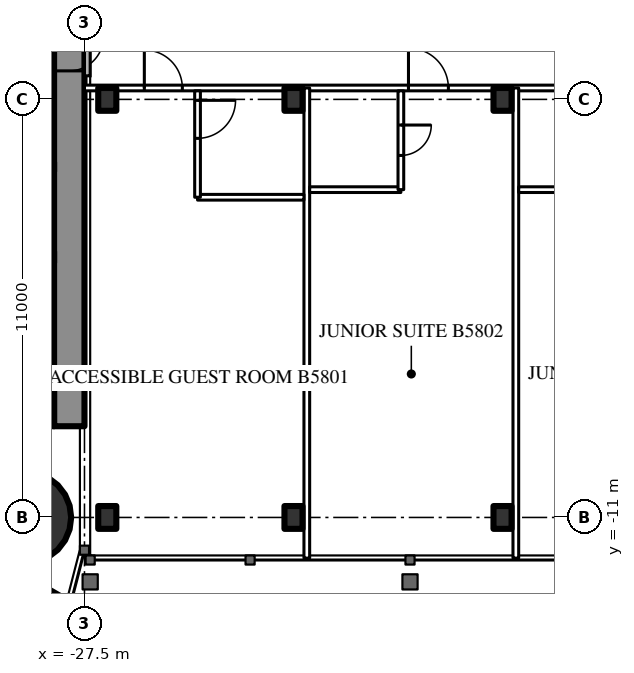
"""IFC4 building model, lengths in metres.
Left out: names, types, materials, properties, quantities, classifications, styles, units other than length and angle.
Written with IfcOpenShell. Run it as: python <this file> out.ifc"""

import sys

from ifc_helpers import new_model, si_unit, direction, frame, frame_2d, origin, origin_2d, place, context, subcontext, project, spatial, rectangle, circle, i_section, extrude, element, fill, save


model = new_model("IFC4")
c1 = context("Model", 3, precision=1e-05, world=origin(), true_north=direction((0.0, 1.0)))
c2 = subcontext(c1, "Body", "Model", "MODEL_VIEW")
j1 = project(units=[si_unit("LENGTHUNIT", "METRE"), si_unit("PLANEANGLEUNIT", "RADIAN")], contexts=[c1])
p1 = place(None, origin())
s1 = spatial("IfcSite", under=j1, at=p1, CompositionType="ELEMENT")
p2 = place(p1, origin())
s2 = spatial("IfcBuilding", under=s1, at=p2, CompositionType="ELEMENT")
p3 = place(p2, frame((0.0, 0.0, 218.9)))
s3 = spatial("IfcBuildingStorey", under=s2, at=p3, CompositionType="ELEMENT", Elevation=218.9)
p4 = place(p3, frame((-29.05, -11.0, 0.0), z_axis=(0.0, 0.0, 1.0), x_axis=(1.0, 0.0, 0.0)))
e1 = element("IfcColumn", 1, at=p4, inside=s3, PredefinedType="COLUMN", context=c2, shape_type="SweptSolid", body=[
    extrude(circle(Radius=1.2, at=origin_2d()), origin(), (0.0, 0.0, 1.0), 3.6),
])
p5 = place(p3, frame((-27.9, 8.6, 0.0), z_axis=(0.0, 0.0, 1.0), x_axis=(0.0, -1.0, 0.0)))
e2 = element("IfcWall", 2, at=p5, inside=s3, PredefinedType="SHEAR", context=c2, shape_type="SweptSolid", body=[
    extrude(rectangle(XDim=17.2, YDim=0.8, at=frame_2d((8.6, 0.0))), origin(), (0.0, 0.0, 1.0), 3.6),
])
p6 = place(p5, frame((6.95, 0.0, 0.0)))
e3 = element("IfcOpeningElement", 3, at=p6, cuts=e2, PredefinedType="OPENING", context=c2, shape_type="SweptSolid", body=[
    extrude(rectangle(XDim=0.9, YDim=2.2, at=frame_2d((0.45, 1.1))), frame((0.0, 0.41, 0.0), z_axis=(0.0, -1.0, 0.0), x_axis=(1.0, 0.0, 0.0)), (0.0, 0.0, 1.0), 0.82),
])
p7 = place(p3, frame((-28.3, -8.0, 0.0), z_axis=(0.0, 0.0, 1.0), x_axis=(-1.0, 0.0, 0.0)))
e4 = element("IfcWall", 4, at=p7, inside=s3, PredefinedType="SHEAR", context=c2, shape_type="SweptSolid", body=[
    extrude(rectangle(XDim=8.4, YDim=1.2, at=frame_2d((4.2, 0.0))), origin(), (0.0, 0.0, 1.0), 3.6),
])
p8 = place(p7, frame((0.25, 0.0, 0.0)))
e5 = element("IfcOpeningElement", 5, at=p8, cuts=e4, PredefinedType="OPENING", context=c2, shape_type="SweptSolid", body=[
    extrude(rectangle(XDim=1.0, YDim=2.2, at=frame_2d((0.5, 1.1))), frame((0.0, 0.61, 0.0), z_axis=(0.0, -1.0, 0.0), x_axis=(1.0, 0.0, 0.0)), (0.0, 0.0, 1.0), 1.22),
])
p9 = place(p3, frame((-28.3, -4.15, 0.0), z_axis=(0.0, 0.0, 1.0), x_axis=(-1.0, 0.0, 0.0)))
e6 = element("IfcWall", 6, at=p9, inside=s3, PredefinedType="SHEAR", context=c2, shape_type="SweptSolid", body=[
    extrude(rectangle(XDim=8.4, YDim=0.3, at=frame_2d((4.2, 0.0))), origin(), (0.0, 0.0, 1.0), 3.6),
])
p10 = place(p3, frame((-28.3, -1.775, 0.0), z_axis=(0.0, 0.0, 1.0), x_axis=(-1.0, 0.0, 0.0)))
e7 = element("IfcWall", 7, at=p10, inside=s3, PredefinedType="SHEAR", context=c2, shape_type="SweptSolid", body=[
    extrude(rectangle(XDim=2.9, YDim=0.25, at=frame_2d((1.45, 0.0))), origin(), (0.0, 0.0, 1.0), 3.6),
])
p11 = place(p3, frame((-27.2, 14.3, 0.0), z_axis=(0.0, 0.0, 1.0), x_axis=(-0.866026593062, -0.499997940104, 0.0)))
e8 = element("IfcWall", 8, at=p11, inside=s3, PredefinedType="SHEAR", context=c2, shape_type="SweptSolid", body=[
    extrude(rectangle(XDim=28.946, YDim=1.2, at=frame_2d((14.473, 0.0))), origin(), (0.0, 0.0, 1.0), 3.6),
])
p12 = place(p11, frame((4.6, 0.0, 0.0)))
e9 = element("IfcOpeningElement", 9, at=p12, cuts=e8, PredefinedType="OPENING", context=c2, shape_type="SweptSolid", body=[
    extrude(rectangle(XDim=1.0, YDim=2.2, at=frame_2d((0.5, 1.1))), frame((0.0, 0.61, 0.0), z_axis=(0.0, -1.0, 0.0), x_axis=(1.0, 0.0, 0.0)), (0.0, 0.0, 1.0), 1.22),
])
p13 = place(p11, frame((13.395, 0.0, 0.0)))
e10 = element("IfcOpeningElement", 10, at=p13, cuts=e8, PredefinedType="OPENING", context=c2, shape_type="SweptSolid", body=[
    extrude(rectangle(XDim=1.8, YDim=2.2, at=frame_2d((0.9, 1.1))), frame((0.0, 0.61, 0.0), z_axis=(0.0, -1.0, 0.0), x_axis=(1.0, 0.0, 0.0)), (0.0, 0.0, 1.0), 1.22),
])
p14 = place(p3, frame((-27.2, -14.3, 0.0), z_axis=(0.0, 0.0, 1.0), x_axis=(-0.866024021859, 0.500002393557, 0.0)))
e11 = element("IfcWall", 11, at=p14, inside=s3, PredefinedType="SHEAR", context=c2, shape_type="SweptSolid", body=[
    extrude(rectangle(XDim=27.907, YDim=1.2, at=frame_2d((13.954, 0.0))), origin(), (0.0, 0.0, 1.0), 3.6),
])
p15 = place(p14, frame((4.6, 0.0, 0.0)))
e12 = element("IfcOpeningElement", 12, at=p15, cuts=e11, PredefinedType="OPENING", context=c2, shape_type="SweptSolid", body=[
    extrude(rectangle(XDim=1.0, YDim=2.2, at=frame_2d((0.5, 1.1))), frame((0.0, 0.61, 0.0), z_axis=(0.0, -1.0, 0.0), x_axis=(1.0, 0.0, 0.0)), (0.0, 0.0, 1.0), 1.22),
])
p16 = place(p14, frame((13.395, 0.0, 0.0)))
e13 = element("IfcOpeningElement", 13, at=p16, cuts=e11, PredefinedType="OPENING", context=c2, shape_type="SweptSolid", body=[
    extrude(rectangle(XDim=1.8, YDim=2.2, at=frame_2d((0.9, 1.1))), frame((0.0, 0.61, 0.0), z_axis=(0.0, -1.0, 0.0), x_axis=(1.0, 0.0, 0.0)), (0.0, 0.0, 1.0), 1.22),
])
for number, where, z_axis, x_axis in (
    (14, (-26.9, -11.0, 0.0), (0.0, 0.0, 1.0), (1.0, 0.0, 0.0)),
    (15, (-22.0, -11.0, 0.0), (0.0, 0.0, 1.0), (1.0, 0.0, 0.0)),
    (16, (-16.5, -11.0, 0.0), (0.0, 0.0, 1.0), (1.0, 0.0, 0.0)),
    (17, (-26.9, 0.0, 0.0), (0.0, 0.0, 1.0), (1.0, 0.0, 0.0)),
    (18, (-22.0, 0.0, 0.0), (0.0, 0.0, 1.0), (1.0, 0.0, 0.0)),
    (19, (-16.5, 0.0, 0.0), (0.0, 0.0, 1.0), (1.0, 0.0, 0.0)),
):
    element("IfcColumn", number, at=place(p3, frame(where, z_axis=z_axis, x_axis=x_axis)), inside=s3, PredefinedType="COLUMN", context=c2, shape_type="SweptSolid", body=[
        extrude(i_section(OverallWidth=0.476, OverallDepth=0.6, WebThickness=0.1, FlangeThickness=0.14, FilletRadius=0.02, at=origin_2d()), origin(), (0.0, 0.0, 1.0), 3.6),
    ])
p17 = place(p3, frame((-27.5, 0.3, 0.0), z_axis=(0.0, 0.0, 1.0), x_axis=(1.0, 0.0, 0.0)))
e20 = element("IfcWall", 20, at=p17, inside=s3, PredefinedType="PARTITIONING", context=c2, shape_type="SweptSolid", body=[
    extrude(rectangle(XDim=55.0, YDim=0.15, at=frame_2d((27.5, 0.0))), origin(), (0.0, 0.0, 1.0), 2.4),
])
p18 = place(p17, frame((1.575, 0.0, 0.0)))
e21 = element("IfcOpeningElement", 21, at=p18, cuts=e20, PredefinedType="OPENING", context=c2, shape_type="SweptSolid", body=[
    extrude(rectangle(XDim=1.0, YDim=2.2, at=frame_2d((0.5, 1.1))), frame((0.0, 0.085, 0.0), z_axis=(0.0, -1.0, 0.0), x_axis=(1.0, 0.0, 0.0)), (0.0, 0.0, 1.0), 0.17),
])
p19 = place(p17, frame((8.525, 0.0, 0.0)))
e22 = element("IfcOpeningElement", 22, at=p19, cuts=e20, PredefinedType="OPENING", context=c2, shape_type="SweptSolid", body=[
    extrude(rectangle(XDim=1.05, YDim=2.4, at=frame_2d((0.525, 1.2))), frame((0.0, 0.085, 0.0), z_axis=(0.0, -1.0, 0.0), x_axis=(1.0, 0.0, 0.0)), (0.0, 0.0, 1.0), 0.17),
])
p20 = place(p17, frame((14.025, 0.0, 0.0)))
e23 = element("IfcOpeningElement", 23, at=p20, cuts=e20, PredefinedType="OPENING", context=c2, shape_type="SweptSolid", body=[
    extrude(rectangle(XDim=1.05, YDim=2.4, at=frame_2d((0.525, 1.2))), frame((0.0, 0.085, 0.0), z_axis=(0.0, -1.0, 0.0), x_axis=(1.0, 0.0, 0.0)), (0.0, 0.0, 1.0), 0.17),
])
p21 = place(p17, frame((19.525, 0.0, 0.0)))
e24 = element("IfcOpeningElement", 24, at=p21, cuts=e20, PredefinedType="OPENING", context=c2, shape_type="SweptSolid", body=[
    extrude(rectangle(XDim=1.05, YDim=2.4, at=frame_2d((0.525, 1.2))), frame((0.0, 0.085, 0.0), z_axis=(0.0, -1.0, 0.0), x_axis=(1.0, 0.0, 0.0)), (0.0, 0.0, 1.0), 0.17),
])
p22 = place(p17, frame((25.025, 0.0, 0.0)))
e25 = element("IfcOpeningElement", 25, at=p22, cuts=e20, PredefinedType="OPENING", context=c2, shape_type="SweptSolid", body=[
    extrude(rectangle(XDim=1.05, YDim=2.4, at=frame_2d((0.525, 1.2))), frame((0.0, 0.085, 0.0), z_axis=(0.0, -1.0, 0.0), x_axis=(1.0, 0.0, 0.0)), (0.0, 0.0, 1.0), 0.17),
])
p23 = place(p17, frame((30.525, 0.0, 0.0)))
e26 = element("IfcOpeningElement", 26, at=p23, cuts=e20, PredefinedType="OPENING", context=c2, shape_type="SweptSolid", body=[
    extrude(rectangle(XDim=1.05, YDim=2.4, at=frame_2d((0.525, 1.2))), frame((0.0, 0.085, 0.0), z_axis=(0.0, -1.0, 0.0), x_axis=(1.0, 0.0, 0.0)), (0.0, 0.0, 1.0), 0.17),
])
p24 = place(p17, frame((36.025, 0.0, 0.0)))
e27 = element("IfcOpeningElement", 27, at=p24, cuts=e20, PredefinedType="OPENING", context=c2, shape_type="SweptSolid", body=[
    extrude(rectangle(XDim=1.05, YDim=2.4, at=frame_2d((0.525, 1.2))), frame((0.0, 0.085, 0.0), z_axis=(0.0, -1.0, 0.0), x_axis=(1.0, 0.0, 0.0)), (0.0, 0.0, 1.0), 0.17),
])
p25 = place(p17, frame((41.525, 0.0, 0.0)))
e28 = element("IfcOpeningElement", 28, at=p25, cuts=e20, PredefinedType="OPENING", context=c2, shape_type="SweptSolid", body=[
    extrude(rectangle(XDim=1.05, YDim=2.4, at=frame_2d((0.525, 1.2))), frame((0.0, 0.085, 0.0), z_axis=(0.0, -1.0, 0.0), x_axis=(1.0, 0.0, 0.0)), (0.0, 0.0, 1.0), 0.17),
])
p26 = place(p17, frame((47.025, 0.0, 0.0)))
e29 = element("IfcOpeningElement", 29, at=p26, cuts=e20, PredefinedType="OPENING", context=c2, shape_type="SweptSolid", body=[
    extrude(rectangle(XDim=1.05, YDim=2.4, at=frame_2d((0.525, 1.2))), frame((0.0, 0.085, 0.0), z_axis=(0.0, -1.0, 0.0), x_axis=(1.0, 0.0, 0.0)), (0.0, 0.0, 1.0), 0.17),
])
p27 = place(p17, frame((52.525, 0.0, 0.0)))
e30 = element("IfcOpeningElement", 30, at=p27, cuts=e20, PredefinedType="OPENING", context=c2, shape_type="SweptSolid", body=[
    extrude(rectangle(XDim=1.05, YDim=2.4, at=frame_2d((0.525, 1.2))), frame((0.0, 0.085, 0.0), z_axis=(0.0, -1.0, 0.0), x_axis=(1.0, 0.0, 0.0)), (0.0, 0.0, 1.0), 0.17),
])
for number, where, z_axis, x_axis in (
    (31, (-21.65, -12.07, 0.0), (0.0, 0.0, 1.0), (0.0, 1.0, 0.0)),
    (32, (-16.15, -12.07, 0.0), (0.0, 0.0, 1.0), (0.0, 1.0, 0.0)),
):
    element("IfcWall", number, at=place(p3, frame(where, z_axis=z_axis, x_axis=x_axis)), inside=s3, PredefinedType="PARTITIONING", context=c2, shape_type="SweptSolid", body=[
        extrude(rectangle(XDim=12.37, YDim=0.15, at=frame_2d((6.185, 0.0))), origin(), (0.0, 0.0, 1.0), 3.4),
    ])
p28 = place(p3, frame((-24.525, -2.575, 0.0), z_axis=(0.0, 0.0, 1.0), x_axis=(1.0, 0.0, 0.0)))
e33 = element("IfcWall", 33, at=p28, inside=s3, PredefinedType="PARTITIONING", context=c2, shape_type="SweptSolid", body=[
    extrude(rectangle(XDim=2.8, YDim=0.15, at=frame_2d((1.4, 0.0))), origin(), (0.0, 0.0, 1.0), 3.4),
])
p29 = place(p3, frame((-24.525, -2.575, 0.0), z_axis=(0.0, 0.0, 1.0), x_axis=(0.0, 1.0, 0.0)))
e34 = element("IfcWall", 34, at=p29, inside=s3, PredefinedType="PARTITIONING", context=c2, shape_type="SweptSolid", body=[
    extrude(rectangle(XDim=2.8, YDim=0.15, at=frame_2d((1.4, 0.0))), origin(), (0.0, 0.0, 1.0), 3.4),
])
p30 = place(p29, frame((1.55, 0.0, 0.0)))
e35 = element("IfcOpeningElement", 35, at=p30, cuts=e34, PredefinedType="OPENING", context=c2, shape_type="SweptSolid", body=[
    extrude(rectangle(XDim=1.0, YDim=2.2, at=frame_2d((0.5, 1.1))), frame((0.0, 0.085, 0.0), z_axis=(0.0, -1.0, 0.0), x_axis=(1.0, 0.0, 0.0)), (0.0, 0.0, 1.0), 0.17),
])
p31 = place(p3, frame((-21.575, -2.375, 0.0), z_axis=(0.0, 0.0, 1.0), x_axis=(1.0, 0.0, 0.0)))
e36 = element("IfcWall", 36, at=p31, inside=s3, PredefinedType="PARTITIONING", context=c2, shape_type="SweptSolid", body=[
    extrude(rectangle(XDim=2.4, YDim=0.15, at=frame_2d((1.2, 0.0))), origin(), (0.0, 0.0, 1.0), 3.4),
])
p32 = place(p3, frame((-19.175, -2.375, 0.0), z_axis=(0.0, 0.0, 1.0), x_axis=(0.0, 1.0, 0.0)))
e37 = element("IfcWall", 37, at=p32, inside=s3, PredefinedType="PARTITIONING", context=c2, shape_type="SweptSolid", body=[
    extrude(rectangle(XDim=2.6, YDim=0.15, at=frame_2d((1.3, 0.0))), origin(), (0.0, 0.0, 1.0), 3.4),
])
p33 = place(p32, frame((0.9, 0.0, 0.0)))
e38 = element("IfcOpeningElement", 38, at=p33, cuts=e37, PredefinedType="OPENING", context=c2, shape_type="SweptSolid", body=[
    extrude(rectangle(XDim=0.8, YDim=2.2, at=frame_2d((0.4, 1.1))), frame((0.0, 0.085, 0.0), z_axis=(0.0, -1.0, 0.0), x_axis=(1.0, 0.0, 0.0)), (0.0, 0.0, 1.0), 0.17),
])
p34 = place(p3, frame((-16.075, -2.375, 0.0), z_axis=(0.0, 0.0, 1.0), x_axis=(1.0, 0.0, 0.0)))
e39 = element("IfcWall", 39, at=p34, inside=s3, PredefinedType="PARTITIONING", context=c2, shape_type="SweptSolid", body=[
    extrude(rectangle(XDim=2.4, YDim=0.15, at=frame_2d((1.2, 0.0))), origin(), (0.0, 0.0, 1.0), 3.4),
])
p35 = place(p6, origin())
e40 = element("IfcDoor", 40, at=p35, inside=s3, OperationType="SINGLE_SWING_LEFT", PredefinedType="DOOR", context=c2, shape_type="SweptSolid", body=[
    extrude(rectangle(XDim=0.9, YDim=2.2, at=frame_2d((0.45, 1.1))), frame((0.0, 0.025, 0.0), z_axis=(0.0, -1.0, 0.0), x_axis=(1.0, 0.0, 0.0)), (0.0, 0.0, 1.0), 0.05),
])
fill(e3, e40)
p36 = place(p30, origin())
e41 = element("IfcDoor", 41, at=p36, inside=s3, OperationType="SINGLE_SWING_RIGHT", PredefinedType="DOOR", context=c2, shape_type="SweptSolid", body=[
    extrude(rectangle(XDim=1.0, YDim=2.2, at=frame_2d((0.5, 1.1))), frame((0.0, 0.025, 0.0), z_axis=(0.0, -1.0, 0.0), x_axis=(1.0, 0.0, 0.0)), (0.0, 0.0, 1.0), 0.05),
])
fill(e35, e41)
p37 = place(p18, origin())
e42 = element("IfcDoor", 42, at=p37, inside=s3, OperationType="SINGLE_SWING_LEFT", PredefinedType="DOOR", context=c2, shape_type="SweptSolid", body=[
    extrude(rectangle(XDim=1.0, YDim=2.2, at=frame_2d((0.5, 1.1))), frame((0.0, 0.025, 0.0), z_axis=(0.0, -1.0, 0.0), x_axis=(1.0, 0.0, 0.0)), (0.0, 0.0, 1.0), 0.05),
])
fill(e21, e42)
p38 = place(p33, origin())
e43 = element("IfcDoor", 43, at=p38, inside=s3, OperationType="SINGLE_SWING_RIGHT", PredefinedType="DOOR", context=c2, shape_type="SweptSolid", body=[
    extrude(rectangle(XDim=0.8, YDim=2.2, at=frame_2d((0.4, 1.1))), frame((0.0, 0.025, 0.0), z_axis=(0.0, -1.0, 0.0), x_axis=(1.0, 0.0, 0.0)), (0.0, 0.0, 1.0), 0.05),
])
fill(e38, e43)
p39 = place(p19, origin())
e44 = element("IfcDoor", 44, at=p39, inside=s3, OperationType="SINGLE_SWING_LEFT", PredefinedType="DOOR", context=c2, shape_type="SweptSolid", body=[
    extrude(rectangle(XDim=1.05, YDim=2.4, at=frame_2d((0.525, 1.2))), frame((0.0, 0.025, 0.0), z_axis=(0.0, -1.0, 0.0), x_axis=(1.0, 0.0, 0.0)), (0.0, 0.0, 1.0), 0.05),
])
fill(e22, e44)
save(model, sys.argv[1])
